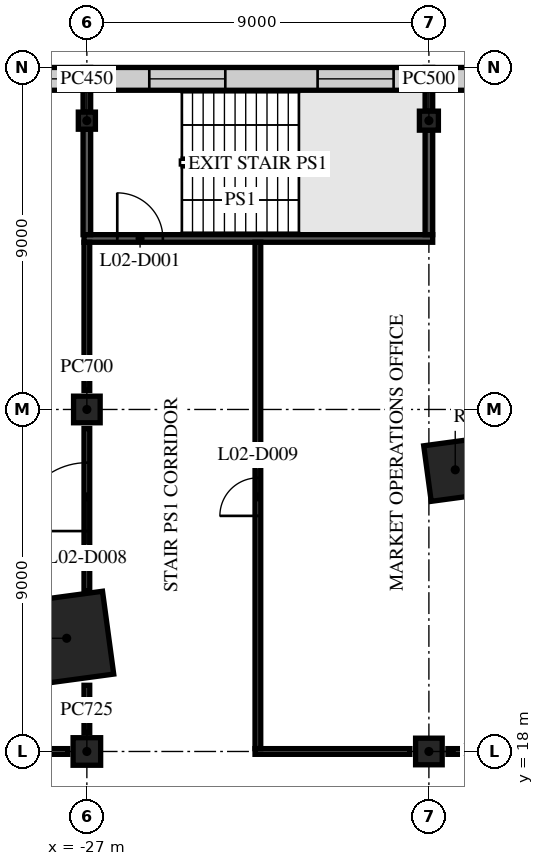
"""IFC4 building model, lengths in metres.
Left out: names, types, materials, properties, quantities, classifications, styles, units other than length and angle.
Written with IfcOpenShell. Run it as: python <this file> out.ifc"""

import sys

from ifc_helpers import new_model, si_unit, direction, frame, frame_2d, origin, origin_2d, place, context, subcontext, project, spatial, rectangle, extrude, element, fill, save


model = new_model("IFC4")
c1 = context("Model", 3, precision=1e-05, world=origin(), true_north=direction((0.0, 1.0)))
c2 = subcontext(c1, "Body", "Model", "MODEL_VIEW")
j1 = project(units=[si_unit("LENGTHUNIT", "METRE"), si_unit("PLANEANGLEUNIT", "RADIAN")], contexts=[c1])
p1 = place(None, origin())
s1 = spatial("IfcSite", under=j1, at=p1, CompositionType="ELEMENT")
p2 = place(p1, origin())
s2 = spatial("IfcBuilding", under=s1, at=p2, CompositionType="ELEMENT")
p3 = place(p2, frame((0.0, 0.0, 9.0)))
s3 = spatial("IfcBuildingStorey", under=s2, at=p3, CompositionType="ELEMENT", Elevation=9.0)
p4 = place(p3, frame((-27.0, 18.0, 0.0), z_axis=(0.0, 0.0, 1.0), x_axis=(1.0, 0.0, 0.0)))
e1 = element("IfcColumn", 1, at=p4, inside=s3, PredefinedType="COLUMN", context=c2, shape_type="SweptSolid", body=[
    extrude(rectangle(XDim=0.725, YDim=0.725, at=origin_2d()), origin(), (0.0, 0.0, 1.0), 4.5),
])
p5 = place(p3, frame((-27.0, 27.0, 0.0), z_axis=(0.0, 0.0, 1.0), x_axis=(1.0, 0.0, 0.0)))
e2 = element("IfcColumn", 2, at=p5, inside=s3, PredefinedType="COLUMN", context=c2, shape_type="SweptSolid", body=[
    extrude(rectangle(XDim=0.7, YDim=0.7, at=origin_2d()), origin(), (0.0, 0.0, 1.0), 4.5),
])
p6 = place(p3, frame((-27.0, 34.6, 0.0), z_axis=(0.0, 0.0, 1.0), x_axis=(1.0, 0.0, 0.0)))
e3 = element("IfcColumn", 3, at=p6, inside=s3, PredefinedType="COLUMN", context=c2, shape_type="SweptSolid", body=[
    extrude(rectangle(XDim=0.45, YDim=0.45, at=origin_2d()), origin(), (0.0, 0.0, 1.0), 4.5),
])
p7 = place(p3, frame((-18.0, 18.0, 0.0), z_axis=(0.0, 0.0, 1.0), x_axis=(1.0, 0.0, 0.0)))
e4 = element("IfcColumn", 4, at=p7, inside=s3, PredefinedType="COLUMN", context=c2, shape_type="SweptSolid", body=[
    extrude(rectangle(XDim=0.7, YDim=0.7, at=origin_2d()), origin(), (0.0, 0.0, 1.0), 4.5),
])
p8 = place(p3, frame((-18.0, 34.6, 0.0), z_axis=(0.0, 0.0, 1.0), x_axis=(1.0, 0.0, 0.0)))
e5 = element("IfcColumn", 5, at=p8, inside=s3, PredefinedType="COLUMN", context=c2, shape_type="SweptSolid", body=[
    extrude(rectangle(XDim=0.5, YDim=0.5, at=origin_2d()), origin(), (0.0, 0.0, 1.0), 4.5),
])
p9 = place(p3, frame((-17.307, 25.412, 0.0), z_axis=(0.0, 0.0, 1.0), x_axis=(0.991001197216, 0.133853005627, 0.0)))
e6 = element("IfcColumn", 6, at=p9, inside=s3, PredefinedType="COLUMN", context=c2, shape_type="SweptSolid", body=[
    extrude(rectangle(XDim=1.475, YDim=1.475, at=origin_2d()), origin(), (0.0, 0.0, 1.0), 4.5),
])
p10 = place(p3, frame((-27.531, 20.979, 0.0), z_axis=(0.0, 0.0, 1.0), x_axis=(0.991001197216, 0.133853005627, 0.0)))
e7 = element("IfcColumn", 7, at=p10, inside=s3, PredefinedType="COLUMN", context=c2, shape_type="SweptSolid", body=[
    extrude(rectangle(XDim=2.2, YDim=2.2, at=origin_2d()), origin(), (0.0, 0.0, 1.0), 4.5),
])
p11 = place(p3, frame((-34.1, 18.0, 0.0), z_axis=(0.0, 0.0, 1.0), x_axis=(1.0, 0.0, 0.0)))
e8 = element("IfcWall", 8, at=p11, inside=s3, PredefinedType="PARTITIONING", context=c2, shape_type="SweptSolid", body=[
    extrude(rectangle(XDim=6.6, YDim=0.15, at=frame_2d((3.3, 0.0))), origin(), (0.0, 0.0, 1.0), 4.1),
])
p12 = place(p3, frame((-22.575, 18.0, 0.0), z_axis=(0.0, 0.0, 1.0), x_axis=(1.0, 0.0, 0.0)))
e9 = element("IfcWall", 9, at=p12, inside=s3, PredefinedType="PARTITIONING", context=c2, shape_type="SweptSolid", body=[
    extrude(rectangle(XDim=4.075, YDim=0.15, at=frame_2d((2.038, 0.0))), origin(), (0.0, 0.0, 1.0), 4.1),
])
p13 = place(p3, frame((-17.5, 18.0, 0.0), z_axis=(0.0, 0.0, 1.0), x_axis=(1.0, 0.0, 0.0)))
e10 = element("IfcWall", 10, at=p13, inside=s3, PredefinedType="PARTITIONING", context=c2, shape_type="SweptSolid", body=[
    extrude(rectangle(XDim=8.0, YDim=0.15, at=frame_2d((4.0, 0.0))), origin(), (0.0, 0.0, 1.0), 4.1),
])
p14 = place(p3, frame((-27.075, 31.5, 0.0), z_axis=(0.0, 0.0, 1.0), x_axis=(1.0, 0.0, 0.0)))
e11 = element("IfcWall", 11, at=p14, inside=s3, PredefinedType="PARTITIONING", context=c2, shape_type="SweptSolid", body=[
    extrude(rectangle(XDim=9.175, YDim=0.2, at=frame_2d((4.587, 0.0))), origin(), (0.0, 0.0, 1.0), 4.1),
])
p15 = place(p14, frame((0.875, 0.0, 0.0)))
e12 = element("IfcOpeningElement", 12, at=p15, cuts=e11, PredefinedType="OPENING", context=c2, shape_type="SweptSolid", body=[
    extrude(rectangle(XDim=1.2, YDim=2.1, at=frame_2d((0.6, 1.05))), frame((0.0, 0.11, 0.0), z_axis=(0.0, -1.0, 0.0), x_axis=(1.0, 0.0, 0.0)), (0.0, 0.0, 1.0), 0.22),
])
p16 = place(p3, frame((-27.0, 18.5, 0.0), z_axis=(0.0, 0.0, 1.0), x_axis=(0.0, 1.0, 0.0)))
e13 = element("IfcWall", 13, at=p16, inside=s3, PredefinedType="PARTITIONING", context=c2, shape_type="SweptSolid", body=[
    extrude(rectangle(XDim=1.242, YDim=0.15, at=frame_2d((0.621, 0.0))), origin(), (0.0, 0.0, 1.0), 4.1),
])
p17 = place(p3, frame((-27.0, 22.216, 0.0), z_axis=(0.0, 0.0, 1.0), x_axis=(0.0, 1.0, 0.0)))
e14 = element("IfcWall", 14, at=p17, inside=s3, PredefinedType="PARTITIONING", context=c2, shape_type="SweptSolid", body=[
    extrude(rectangle(XDim=4.284, YDim=0.15, at=frame_2d((2.142, 0.0))), origin(), (0.0, 0.0, 1.0), 4.1),
])
p18 = place(p17, frame((1.584, 0.0, 0.0)))
e15 = element("IfcOpeningElement", 15, at=p18, cuts=e14, PredefinedType="OPENING", context=c2, shape_type="SweptSolid", body=[
    extrude(rectangle(XDim=1.8, YDim=2.1, at=frame_2d((0.9, 1.05))), frame((0.0, 0.085, 0.0), z_axis=(0.0, -1.0, 0.0), x_axis=(1.0, 0.0, 0.0)), (0.0, 0.0, 1.0), 0.17),
])
p19 = place(p3, frame((-27.0, 27.5, 0.0), z_axis=(0.0, 0.0, 1.0), x_axis=(0.0, 1.0, 0.0)))
e16 = element("IfcWall", 16, at=p19, inside=s3, PredefinedType="PARTITIONING", context=c2, shape_type="SweptSolid", body=[
    extrude(rectangle(XDim=3.9, YDim=0.15, at=frame_2d((1.95, 0.0))), origin(), (0.0, 0.0, 1.0), 4.1),
])
p20 = place(p3, frame((-27.0, 31.6, 0.0), z_axis=(0.0, 0.0, 1.0), x_axis=(0.0, 1.0, 0.0)))
e17 = element("IfcWall", 17, at=p20, inside=s3, PredefinedType="PARTITIONING", context=c2, shape_type="SweptSolid", body=[
    extrude(rectangle(XDim=2.775, YDim=0.2, at=frame_2d((1.387, 0.0))), origin(), (0.0, 0.0, 1.0), 4.1),
])
p21 = place(p3, frame((-27.0, 34.825, 0.0), z_axis=(0.0, 0.0, 1.0), x_axis=(0.0, 1.0, 0.0)))
e18 = element("IfcWall", 18, at=p21, inside=s3, PredefinedType="PARTITIONING", context=c2, shape_type="SweptSolid", body=[
    extrude(rectangle(XDim=1.175, YDim=0.2, at=frame_2d((0.587, 0.0))), origin(), (0.0, 0.0, 1.0), 4.1),
])
p22 = place(p3, frame((-22.5, 18.075, 0.0), z_axis=(0.0, 0.0, 1.0), x_axis=(0.0, 1.0, 0.0)))
e19 = element("IfcWall", 19, at=p22, inside=s3, PredefinedType="PARTITIONING", context=c2, shape_type="SweptSolid", body=[
    extrude(rectangle(XDim=13.325, YDim=0.15, at=frame_2d((6.663, 0.0))), origin(), (0.0, 0.0, 1.0), 4.1),
])
p23 = place(p22, frame((6.125, 0.0, 0.0)))
e20 = element("IfcOpeningElement", 20, at=p23, cuts=e19, PredefinedType="OPENING", context=c2, shape_type="SweptSolid", body=[
    extrude(rectangle(XDim=1.0, YDim=2.1, at=frame_2d((0.5, 1.05))), frame((0.0, 0.085, 0.0), z_axis=(0.0, -1.0, 0.0), x_axis=(1.0, 0.0, 0.0)), (0.0, 0.0, 1.0), 0.17),
])
p24 = place(p3, frame((-18.0, 31.6, 0.0), z_axis=(0.0, 0.0, 1.0), x_axis=(0.0, 1.0, 0.0)))
e21 = element("IfcWall", 21, at=p24, inside=s3, PredefinedType="PARTITIONING", context=c2, shape_type="SweptSolid", body=[
    extrude(rectangle(XDim=2.75, YDim=0.2, at=frame_2d((1.375, 0.0))), origin(), (0.0, 0.0, 1.0), 4.1),
])
p25 = place(p3, frame((-18.0, 34.85, 0.0), z_axis=(0.0, 0.0, 1.0), x_axis=(0.0, 1.0, 0.0)))
e22 = element("IfcWall", 22, at=p25, inside=s3, PredefinedType="PARTITIONING", context=c2, shape_type="SweptSolid", body=[
    extrude(rectangle(XDim=1.15, YDim=0.2, at=frame_2d((0.575, 0.0))), origin(), (0.0, 0.0, 1.0), 4.1),
])
p26 = place(p3, frame((30.876, 35.7, 0.0), z_axis=(0.0, 0.0, 1.0), x_axis=(-1.0, 0.0, 0.0)))
e23 = element("IfcWall", 23, at=p26, inside=s3, PredefinedType="STANDARD", context=c2, shape_type="SweptSolid", body=[
    extrude(rectangle(XDim=61.751, YDim=0.6, at=frame_2d((30.876, 0.0))), origin(), (0.0, 0.0, 1.0), 4.1),
])
p27 = place(p26, frame((1.152, 0.0, 0.9)))
e24 = element("IfcOpeningElement", 24, at=p27, cuts=e23, PredefinedType="OPENING", context=c2, shape_type="SweptSolid", body=[
    extrude(rectangle(XDim=2.0, YDim=3.0, at=frame_2d((1.0, 1.5))), frame((0.0, 0.31, 0.0), z_axis=(0.0, -1.0, 0.0), x_axis=(1.0, 0.0, 0.0)), (0.0, 0.0, 1.0), 0.62),
])
p28 = place(p26, frame((5.519, 0.0, 0.9)))
e25 = element("IfcOpeningElement", 25, at=p28, cuts=e23, PredefinedType="OPENING", context=c2, shape_type="SweptSolid", body=[
    extrude(rectangle(XDim=2.0, YDim=3.0, at=frame_2d((1.0, 1.5))), frame((0.0, 0.31, 0.0), z_axis=(0.0, -1.0, 0.0), x_axis=(1.0, 0.0, 0.0)), (0.0, 0.0, 1.0), 0.62),
])
p29 = place(p26, frame((9.947, 0.0, 0.9)))
e26 = element("IfcOpeningElement", 26, at=p29, cuts=e23, PredefinedType="OPENING", context=c2, shape_type="SweptSolid", body=[
    extrude(rectangle(XDim=2.0, YDim=3.0, at=frame_2d((1.0, 1.5))), frame((0.0, 0.31, 0.0), z_axis=(0.0, -1.0, 0.0), x_axis=(1.0, 0.0, 0.0)), (0.0, 0.0, 1.0), 0.62),
])
p30 = place(p26, frame((14.376, 0.0, 0.9)))
e27 = element("IfcOpeningElement", 27, at=p30, cuts=e23, PredefinedType="OPENING", context=c2, shape_type="SweptSolid", body=[
    extrude(rectangle(XDim=2.0, YDim=3.0, at=frame_2d((1.0, 1.5))), frame((0.0, 0.31, 0.0), z_axis=(0.0, -1.0, 0.0), x_axis=(1.0, 0.0, 0.0)), (0.0, 0.0, 1.0), 0.62),
])
p31 = place(p26, frame((18.804, 0.0, 0.9)))
e28 = element("IfcOpeningElement", 28, at=p31, cuts=e23, PredefinedType="OPENING", context=c2, shape_type="SweptSolid", body=[
    extrude(rectangle(XDim=2.0, YDim=3.0, at=frame_2d((1.0, 1.5))), frame((0.0, 0.31, 0.0), z_axis=(0.0, -1.0, 0.0), x_axis=(1.0, 0.0, 0.0)), (0.0, 0.0, 1.0), 0.62),
])
p32 = place(p26, frame((23.233, 0.0, 0.9)))
e29 = element("IfcOpeningElement", 29, at=p32, cuts=e23, PredefinedType="OPENING", context=c2, shape_type="SweptSolid", body=[
    extrude(rectangle(XDim=2.0, YDim=3.0, at=frame_2d((1.0, 1.5))), frame((0.0, 0.31, 0.0), z_axis=(0.0, -1.0, 0.0), x_axis=(1.0, 0.0, 0.0)), (0.0, 0.0, 1.0), 0.62),
])
p33 = place(p26, frame((27.662, 0.0, 0.9)))
e30 = element("IfcOpeningElement", 30, at=p33, cuts=e23, PredefinedType="OPENING", context=c2, shape_type="SweptSolid", body=[
    extrude(rectangle(XDim=2.0, YDim=3.0, at=frame_2d((1.0, 1.5))), frame((0.0, 0.31, 0.0), z_axis=(0.0, -1.0, 0.0), x_axis=(1.0, 0.0, 0.0)), (0.0, 0.0, 1.0), 0.62),
])
p34 = place(p26, frame((32.09, 0.0, 0.9)))
e31 = element("IfcOpeningElement", 31, at=p34, cuts=e23, PredefinedType="OPENING", context=c2, shape_type="SweptSolid", body=[
    extrude(rectangle(XDim=2.0, YDim=3.0, at=frame_2d((1.0, 1.5))), frame((0.0, 0.31, 0.0), z_axis=(0.0, -1.0, 0.0), x_axis=(1.0, 0.0, 0.0)), (0.0, 0.0, 1.0), 0.62),
])
p35 = place(p26, frame((36.519, 0.0, 0.9)))
e32 = element("IfcOpeningElement", 32, at=p35, cuts=e23, PredefinedType="OPENING", context=c2, shape_type="SweptSolid", body=[
    extrude(rectangle(XDim=2.0, YDim=3.0, at=frame_2d((1.0, 1.5))), frame((0.0, 0.31, 0.0), z_axis=(0.0, -1.0, 0.0), x_axis=(1.0, 0.0, 0.0)), (0.0, 0.0, 1.0), 0.62),
])
p36 = place(p26, frame((40.947, 0.0, 0.9)))
e33 = element("IfcOpeningElement", 33, at=p36, cuts=e23, PredefinedType="OPENING", context=c2, shape_type="SweptSolid", body=[
    extrude(rectangle(XDim=2.0, YDim=3.0, at=frame_2d((1.0, 1.5))), frame((0.0, 0.31, 0.0), z_axis=(0.0, -1.0, 0.0), x_axis=(1.0, 0.0, 0.0)), (0.0, 0.0, 1.0), 0.62),
])
p37 = place(p26, frame((45.376, 0.0, 0.9)))
e34 = element("IfcOpeningElement", 34, at=p37, cuts=e23, PredefinedType="OPENING", context=c2, shape_type="SweptSolid", body=[
    extrude(rectangle(XDim=2.0, YDim=3.0, at=frame_2d((1.0, 1.5))), frame((0.0, 0.31, 0.0), z_axis=(0.0, -1.0, 0.0), x_axis=(1.0, 0.0, 0.0)), (0.0, 0.0, 1.0), 0.62),
])
p38 = place(p26, frame((49.804, 0.0, 0.9)))
e35 = element("IfcOpeningElement", 35, at=p38, cuts=e23, PredefinedType="OPENING", context=c2, shape_type="SweptSolid", body=[
    extrude(rectangle(XDim=2.0, YDim=3.0, at=frame_2d((1.0, 1.5))), frame((0.0, 0.31, 0.0), z_axis=(0.0, -1.0, 0.0), x_axis=(1.0, 0.0, 0.0)), (0.0, 0.0, 1.0), 0.62),
])
p39 = place(p26, frame((54.233, 0.0, 0.9)))
e36 = element("IfcOpeningElement", 36, at=p39, cuts=e23, PredefinedType="OPENING", context=c2, shape_type="SweptSolid", body=[
    extrude(rectangle(XDim=2.0, YDim=3.0, at=frame_2d((1.0, 1.5))), frame((0.0, 0.31, 0.0), z_axis=(0.0, -1.0, 0.0), x_axis=(1.0, 0.0, 0.0)), (0.0, 0.0, 1.0), 0.62),
])
p40 = place(p26, frame((58.599, 0.0, 0.9)))
e37 = element("IfcOpeningElement", 37, at=p40, cuts=e23, PredefinedType="OPENING", context=c2, shape_type="SweptSolid", body=[
    extrude(rectangle(XDim=2.0, YDim=3.0, at=frame_2d((1.0, 1.5))), frame((0.0, 0.31, 0.0), z_axis=(0.0, -1.0, 0.0), x_axis=(1.0, 0.0, 0.0)), (0.0, 0.0, 1.0), 0.62),
])
p41 = place(p15, origin())
e38 = element("IfcDoor", 38, at=p41, inside=s3, OperationType="SINGLE_SWING_LEFT", PredefinedType="DOOR", context=c2, shape_type="SweptSolid", body=[
    extrude(rectangle(XDim=1.2, YDim=2.1, at=frame_2d((0.6, 1.05))), frame((0.0, 0.025, 0.0), z_axis=(0.0, -1.0, 0.0), x_axis=(1.0, 0.0, 0.0)), (0.0, 0.0, 1.0), 0.05),
])
fill(e12, e38)
p42 = place(p18, origin())
e39 = element("IfcDoor", 39, at=p42, inside=s3, OperationType="DOUBLE_DOOR_SINGLE_SWING", PredefinedType="DOOR", context=c2, shape_type="SweptSolid", body=[
    extrude(rectangle(XDim=1.8, YDim=2.1, at=frame_2d((0.9, 1.05))), frame((0.0, 0.025, 0.0), z_axis=(0.0, -1.0, 0.0), x_axis=(1.0, 0.0, 0.0)), (0.0, 0.0, 1.0), 0.05),
])
fill(e15, e39)
p43 = place(p23, origin())
e40 = element("IfcDoor", 40, at=p43, inside=s3, OperationType="SINGLE_SWING_LEFT", PredefinedType="DOOR", context=c2, shape_type="SweptSolid", body=[
    extrude(rectangle(XDim=1.0, YDim=2.1, at=frame_2d((0.5, 1.05))), frame((0.0, 0.025, 0.0), z_axis=(0.0, -1.0, 0.0), x_axis=(1.0, 0.0, 0.0)), (0.0, 0.0, 1.0), 0.05),
])
fill(e20, e40)
p44 = place(p38, origin())
e41 = element("IfcWindow", 41, at=p44, inside=s3, PartitioningType="SINGLE_PANEL", PredefinedType="WINDOW", context=c2, shape_type="SweptSolid", body=[
    extrude(rectangle(XDim=2.0, YDim=3.0, at=frame_2d((1.0, 1.5))), frame((0.0, 0.03, 0.0), z_axis=(0.0, -1.0, 0.0), x_axis=(1.0, 0.0, 0.0)), (0.0, 0.0, 1.0), 0.06),
])
fill(e35, e41)
p45 = place(p39, origin())
e42 = element("IfcWindow", 42, at=p45, inside=s3, PartitioningType="SINGLE_PANEL", PredefinedType="WINDOW", context=c2, shape_type="SweptSolid", body=[
    extrude(rectangle(XDim=2.0, YDim=3.0, at=frame_2d((1.0, 1.5))), frame((0.0, 0.03, 0.0), z_axis=(0.0, -1.0, 0.0), x_axis=(1.0, 0.0, 0.0)), (0.0, 0.0, 1.0), 0.06),
])
fill(e36, e42)
p46 = place(p40, origin())
e43 = element("IfcWindow", 43, at=p46, inside=s3, PartitioningType="SINGLE_PANEL", PredefinedType="WINDOW", context=c2, shape_type="SweptSolid", body=[
    extrude(rectangle(XDim=2.0, YDim=3.0, at=frame_2d((1.0, 1.5))), frame((0.0, 0.03, 0.0), z_axis=(0.0, -1.0, 0.0), x_axis=(1.0, 0.0, 0.0)), (0.0, 0.0, 1.0), 0.06),
])
fill(e37, e43)
save(model, sys.argv[1])
